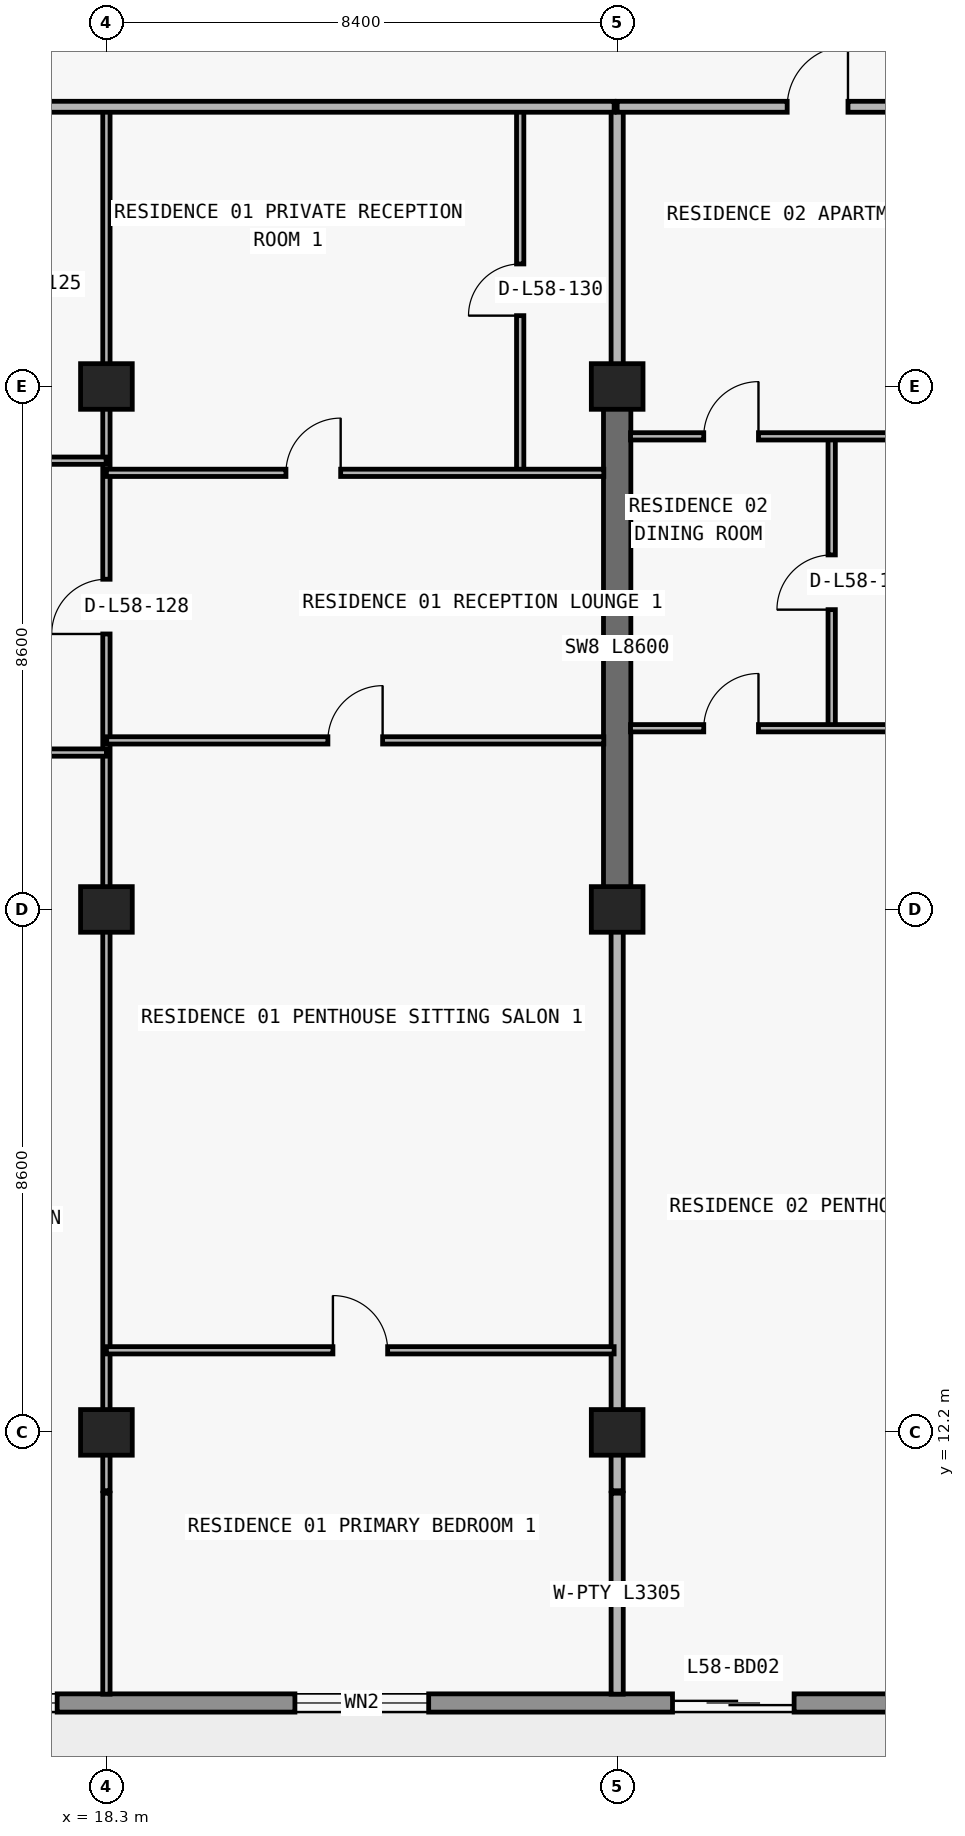
"""IFC4 building model, lengths in metres.
Left out: names, types, materials, properties, quantities, classifications, styles, units other than length and angle.
Written with IfcOpenShell. Run it as: python <this file> out.ifc"""

import sys

from ifc_helpers import new_model, si_unit, direction, frame, frame_2d, origin, origin_2d, place, context, subcontext, project, spatial, rectangle, extrude, element, fill, save


model = new_model("IFC4")
c1 = context("Model", 3, precision=1e-05, world=origin(), true_north=direction((0.0, 1.0)))
c2 = subcontext(c1, "Body", "Model", "MODEL_VIEW")
j1 = project(units=[si_unit("LENGTHUNIT", "METRE"), si_unit("PLANEANGLEUNIT", "RADIAN")], contexts=[c1])
p1 = place(None, origin())
s1 = spatial("IfcSite", under=j1, at=p1, CompositionType="ELEMENT")
p2 = place(p1, origin())
s2 = spatial("IfcBuilding", under=s1, at=p2, CompositionType="ELEMENT")
p3 = place(p2, frame((0.0, 0.0, 208.2)))
s3 = spatial("IfcBuildingStorey", under=s2, at=p3, CompositionType="ELEMENT", Elevation=208.2)
for number, where, z_axis, x_axis in (
    (1, (18.3, 12.2, 0.0), (0.0, 0.0, 1.0), (1.0, 0.0, 0.0)),
    (2, (26.7, 12.2, 0.0), (0.0, 0.0, 1.0), (1.0, 0.0, 0.0)),
    (3, (18.3, 20.8, 0.0), (0.0, 0.0, 1.0), (1.0, 0.0, 0.0)),
    (4, (26.7, 20.8, 0.0), (0.0, 0.0, 1.0), (1.0, 0.0, 0.0)),
    (5, (18.3, 29.4, 0.0), (0.0, 0.0, 1.0), (1.0, 0.0, 0.0)),
    (6, (26.7, 29.4, 0.0), (0.0, 0.0, 1.0), (1.0, 0.0, 0.0)),
):
    element("IfcColumn", number, at=place(p3, frame(where, z_axis=z_axis, x_axis=x_axis)), inside=s3, PredefinedType="COLUMN", context=c2, shape_type="SweptSolid", body=[
        extrude(rectangle(XDim=0.85, YDim=0.75, at=origin_2d()), origin(), (0.0, 0.0, 1.0), 3.05),
    ])
p4 = place(p3, frame((26.7, 20.8, 0.0), z_axis=(0.0, 0.0, 1.0), x_axis=(0.0, 1.0, 0.0)))
e7 = element("IfcWall", 7, at=p4, inside=s3, PredefinedType="SHEAR", context=c2, shape_type="SweptSolid", body=[
    extrude(rectangle(XDim=8.6, YDim=0.45, at=frame_2d((4.3, 0.0))), origin(), (0.0, 0.0, 1.0), 3.05),
])
p5 = place(p3, frame((67.7, 7.75, 0.0), z_axis=(0.0, 0.0, 1.0), x_axis=(-1.0, 0.0, 0.0)))
e8 = element("IfcWall", 8, at=p5, inside=s3, PredefinedType="STANDARD", context=c2, shape_type="SweptSolid", body=[
    extrude(rectangle(XDim=57.6, YDim=0.3, at=frame_2d((28.8, 0.0))), origin(), (0.0, 0.0, 1.0), 3.05),
])
p6 = place(p5, frame((54.69, 0.0, 0.0)))
e9 = element("IfcOpeningElement", 9, at=p6, cuts=e8, PredefinedType="OPENING", context=c2, shape_type="SweptSolid", body=[
    extrude(rectangle(XDim=2.0, YDim=2.3, at=frame_2d((1.0, 1.15))), frame((0.0, 0.16, 0.0), z_axis=(0.0, -1.0, 0.0), x_axis=(1.0, 0.0, 0.0)), (0.0, 0.0, 1.0), 0.32),
])
p7 = place(p5, frame((50.21, 0.0, 0.65)))
e10 = element("IfcOpeningElement", 10, at=p7, cuts=e8, PredefinedType="OPENING", context=c2, shape_type="SweptSolid", body=[
    extrude(rectangle(XDim=2.6, YDim=1.85, at=frame_2d((1.3, 0.925))), frame((0.0, 0.16, 0.0), z_axis=(0.0, -1.0, 0.0), x_axis=(1.0, 0.0, 0.0)), (0.0, 0.0, 1.0), 0.32),
])
p8 = place(p5, frame((44.1, 0.0, 0.85)))
e11 = element("IfcOpeningElement", 11, at=p8, cuts=e8, PredefinedType="OPENING", context=c2, shape_type="SweptSolid", body=[
    extrude(rectangle(XDim=2.2, YDim=1.55, at=frame_2d((1.1, 0.775))), frame((0.0, 0.16, 0.0), z_axis=(0.0, -1.0, 0.0), x_axis=(1.0, 0.0, 0.0)), (0.0, 0.0, 1.0), 0.32),
])
p9 = place(p5, frame((38.09, 0.0, 0.0)))
e12 = element("IfcOpeningElement", 12, at=p9, cuts=e8, PredefinedType="OPENING", context=c2, shape_type="SweptSolid", body=[
    extrude(rectangle(XDim=2.0, YDim=2.3, at=frame_2d((1.0, 1.15))), frame((0.0, 0.16, 0.0), z_axis=(0.0, -1.0, 0.0), x_axis=(1.0, 0.0, 0.0)), (0.0, 0.0, 1.0), 0.32),
])
p10 = place(p5, frame((33.41, 0.0, 0.65)))
e13 = element("IfcOpeningElement", 13, at=p10, cuts=e8, PredefinedType="OPENING", context=c2, shape_type="SweptSolid", body=[
    extrude(rectangle(XDim=2.6, YDim=1.85, at=frame_2d((1.3, 0.925))), frame((0.0, 0.16, 0.0), z_axis=(0.0, -1.0, 0.0), x_axis=(1.0, 0.0, 0.0)), (0.0, 0.0, 1.0), 0.32),
])
p11 = place(p5, frame((27.7, 0.0, 0.85)))
e14 = element("IfcOpeningElement", 14, at=p11, cuts=e8, PredefinedType="OPENING", context=c2, shape_type="SweptSolid", body=[
    extrude(rectangle(XDim=2.2, YDim=1.55, at=frame_2d((1.1, 0.775))), frame((0.0, 0.16, 0.0), z_axis=(0.0, -1.0, 0.0), x_axis=(1.0, 0.0, 0.0)), (0.0, 0.0, 1.0), 0.32),
])
p12 = place(p5, frame((19.7, 0.0, 0.85)))
e15 = element("IfcOpeningElement", 15, at=p12, cuts=e8, PredefinedType="OPENING", context=c2, shape_type="SweptSolid", body=[
    extrude(rectangle(XDim=2.2, YDim=1.55, at=frame_2d((1.1, 0.775))), frame((0.0, 0.16, 0.0), z_axis=(0.0, -1.0, 0.0), x_axis=(1.0, 0.0, 0.0)), (0.0, 0.0, 1.0), 0.32),
])
p13 = place(p5, frame((13.69, 0.0, 0.0)))
e16 = element("IfcOpeningElement", 16, at=p13, cuts=e8, PredefinedType="OPENING", context=c2, shape_type="SweptSolid", body=[
    extrude(rectangle(XDim=2.0, YDim=2.3, at=frame_2d((1.0, 1.15))), frame((0.0, 0.16, 0.0), z_axis=(0.0, -1.0, 0.0), x_axis=(1.0, 0.0, 0.0)), (0.0, 0.0, 1.0), 0.32),
])
p14 = place(p5, frame((9.01, 0.0, 0.65)))
e17 = element("IfcOpeningElement", 17, at=p14, cuts=e8, PredefinedType="OPENING", context=c2, shape_type="SweptSolid", body=[
    extrude(rectangle(XDim=2.6, YDim=1.85, at=frame_2d((1.3, 0.925))), frame((0.0, 0.16, 0.0), z_axis=(0.0, -1.0, 0.0), x_axis=(1.0, 0.0, 0.0)), (0.0, 0.0, 1.0), 0.32),
])
p15 = place(p5, frame((3.0, 0.0, 0.85)))
e18 = element("IfcOpeningElement", 18, at=p15, cuts=e8, PredefinedType="OPENING", context=c2, shape_type="SweptSolid", body=[
    extrude(rectangle(XDim=2.2, YDim=1.55, at=frame_2d((1.1, 0.775))), frame((0.0, 0.16, 0.0), z_axis=(0.0, -1.0, 0.0), x_axis=(1.0, 0.0, 0.0)), (0.0, 0.0, 1.0), 0.32),
])
p16 = place(p3, frame((18.3, 7.895, 0.0), z_axis=(0.0, 0.0, 1.0), x_axis=(0.0, 1.0, 0.0)))
e19 = element("IfcWall", 19, at=p16, inside=s3, PredefinedType="PARTITIONING", context=c2, shape_type="SweptSolid", body=[
    extrude(rectangle(XDim=3.305, YDim=0.12, at=frame_2d((1.652, 0.0))), origin(), (0.0, 0.0, 1.0), 3.05),
])
p17 = place(p3, frame((18.3, 11.24, 0.0), z_axis=(0.0, 0.0, 1.0), x_axis=(0.0, 1.0, 0.0)))
e20 = element("IfcWall", 20, at=p17, inside=s3, PredefinedType="PARTITIONING", context=c2, shape_type="SweptSolid", body=[
    extrude(rectangle(XDim=22.76, YDim=0.12, at=frame_2d((11.38, 0.0))), origin(), (0.0, 0.0, 1.0), 2.263),
])
p18 = place(p17, frame((14.09, 0.0, 0.0)))
e21 = element("IfcOpeningElement", 21, at=p18, cuts=e20, PredefinedType="OPENING", context=c2, shape_type="SweptSolid", body=[
    extrude(rectangle(XDim=0.9, YDim=2.15, at=frame_2d((0.45, 1.075))), frame((0.0, 0.07, 0.0), z_axis=(0.0, -1.0, 0.0), x_axis=(1.0, 0.0, 0.0)), (0.0, 0.0, 1.0), 0.14),
])
p19 = place(p3, frame((25.105, 27.98, 0.0), z_axis=(0.0, 0.0, 1.0), x_axis=(0.0, 1.0, 0.0)))
e22 = element("IfcWall", 22, at=p19, inside=s3, PredefinedType="PARTITIONING", context=c2, shape_type="SweptSolid", body=[
    extrude(rectangle(XDim=6.02, YDim=0.12, at=frame_2d((3.01, 0.0))), origin(), (0.0, 0.0, 1.0), 3.05),
])
p20 = place(p19, frame((2.585, 0.0, 0.0)))
e23 = element("IfcOpeningElement", 23, at=p20, cuts=e22, PredefinedType="OPENING", context=c2, shape_type="SweptSolid", body=[
    extrude(rectangle(XDim=0.85, YDim=2.1, at=frame_2d((0.425, 1.05))), frame((0.0, 0.07, 0.0), z_axis=(0.0, -1.0, 0.0), x_axis=(1.0, 0.0, 0.0)), (0.0, 0.0, 1.0), 0.14),
])
p21 = place(p3, frame((26.7, 7.895, 0.0), z_axis=(0.0, 0.0, 1.0), x_axis=(0.0, 1.0, 0.0)))
e24 = element("IfcWall", 24, at=p21, inside=s3, PredefinedType="PARTITIONING", context=c2, shape_type="SweptSolid", body=[
    extrude(rectangle(XDim=3.305, YDim=0.2, at=frame_2d((1.652, 0.0))), origin(), (0.0, 0.0, 1.0), 3.05),
])
p22 = place(p3, frame((26.7, 11.24, 0.0), z_axis=(0.0, 0.0, 1.0), x_axis=(0.0, 1.0, 0.0)))
e25 = element("IfcWall", 25, at=p22, inside=s3, PredefinedType="PARTITIONING", context=c2, shape_type="SweptSolid", body=[
    extrude(rectangle(XDim=9.555, YDim=0.2, at=frame_2d((4.777, 0.0))), origin(), (0.0, 0.0, 1.0), 2.263),
])
p23 = place(p3, frame((26.7, 29.405, 0.0), z_axis=(0.0, 0.0, 1.0), x_axis=(0.0, 1.0, 0.0)))
e26 = element("IfcWall", 26, at=p23, inside=s3, PredefinedType="PARTITIONING", context=c2, shape_type="SweptSolid", body=[
    extrude(rectangle(XDim=4.595, YDim=0.2, at=frame_2d((2.297, 0.0))), origin(), (0.0, 0.0, 1.0), 2.335),
])
p24 = place(p3, frame((30.228, 23.78, 0.0), z_axis=(0.0, 0.0, 1.0), x_axis=(0.0, 1.0, 0.0)))
e27 = element("IfcWall", 27, at=p24, inside=s3, PredefinedType="PARTITIONING", context=c2, shape_type="SweptSolid", body=[
    extrude(rectangle(XDim=4.8, YDim=0.12, at=frame_2d((2.4, 0.0))), origin(), (0.0, 0.0, 1.0), 3.05),
])
p25 = place(p24, frame((1.95, 0.0, 0.0)))
e28 = element("IfcOpeningElement", 28, at=p25, cuts=e27, PredefinedType="OPENING", context=c2, shape_type="SweptSolid", body=[
    extrude(rectangle(XDim=0.9, YDim=2.15, at=frame_2d((0.45, 1.075))), frame((0.0, 0.07, 0.0), z_axis=(0.0, -1.0, 0.0), x_axis=(1.0, 0.0, 0.0)), (0.0, 0.0, 1.0), 0.14),
])
p26 = place(p3, frame((18.3, 13.55, 0.0), z_axis=(0.0, 0.0, 1.0), x_axis=(1.0, 0.0, 0.0)))
e29 = element("IfcWall", 29, at=p26, inside=s3, PredefinedType="PARTITIONING", context=c2, shape_type="SweptSolid", body=[
    extrude(rectangle(XDim=8.35, YDim=0.12, at=frame_2d((4.175, 0.0))), origin(), (0.0, 0.0, 1.0), 3.05),
])
p27 = place(p26, frame((3.725, 0.0, 0.0)))
e30 = element("IfcOpeningElement", 30, at=p27, cuts=e29, PredefinedType="OPENING", context=c2, shape_type="SweptSolid", body=[
    extrude(rectangle(XDim=0.9, YDim=2.15, at=frame_2d((0.45, 1.075))), frame((0.0, 0.07, 0.0), z_axis=(0.0, -1.0, 0.0), x_axis=(1.0, 0.0, 0.0)), (0.0, 0.0, 1.0), 0.14),
])
p28 = place(p3, frame((10.1, 23.38, 0.0), z_axis=(0.0, 0.0, 1.0), x_axis=(1.0, 0.0, 0.0)))
e31 = element("IfcWall", 31, at=p28, inside=s3, PredefinedType="PARTITIONING", context=c2, shape_type="SweptSolid", body=[
    extrude(rectangle(XDim=8.2, YDim=0.12, at=frame_2d((4.1, 0.0))), origin(), (0.0, 0.0, 1.0), 3.05),
])
p29 = place(p28, frame((3.65, 0.0, 0.0)))
e32 = element("IfcOpeningElement", 32, at=p29, cuts=e31, PredefinedType="OPENING", context=c2, shape_type="SweptSolid", body=[
    extrude(rectangle(XDim=0.9, YDim=2.15, at=frame_2d((0.45, 1.075))), frame((0.0, 0.07, 0.0), z_axis=(0.0, -1.0, 0.0), x_axis=(1.0, 0.0, 0.0)), (0.0, 0.0, 1.0), 0.14),
])
p30 = place(p3, frame((18.305, 23.58, 0.0), z_axis=(0.0, 0.0, 1.0), x_axis=(1.0, 0.0, 0.0)))
e33 = element("IfcWall", 33, at=p30, inside=s3, PredefinedType="PARTITIONING", context=c2, shape_type="SweptSolid", body=[
    extrude(rectangle(XDim=8.175, YDim=0.12, at=frame_2d((4.087, 0.0))), origin(), (0.0, 0.0, 1.0), 3.05),
])
p31 = place(p30, frame((3.637, 0.0, 0.0)))
e34 = element("IfcOpeningElement", 34, at=p31, cuts=e33, PredefinedType="OPENING", context=c2, shape_type="SweptSolid", body=[
    extrude(rectangle(XDim=0.9, YDim=2.15, at=frame_2d((0.45, 1.075))), frame((0.0, 0.07, 0.0), z_axis=(0.0, -1.0, 0.0), x_axis=(1.0, 0.0, 0.0)), (0.0, 0.0, 1.0), 0.14),
])
p32 = place(p3, frame((26.92, 23.78, 0.0), z_axis=(0.0, 0.0, 1.0), x_axis=(1.0, 0.0, 0.0)))
e35 = element("IfcWall", 35, at=p32, inside=s3, PredefinedType="PARTITIONING", context=c2, shape_type="SweptSolid", body=[
    extrude(rectangle(XDim=8.18, YDim=0.12, at=frame_2d((4.09, 0.0))), origin(), (0.0, 0.0, 1.0), 3.05),
])
p33 = place(p32, frame((1.204, 0.0, 0.0)))
e36 = element("IfcOpeningElement", 36, at=p33, cuts=e35, PredefinedType="OPENING", context=c2, shape_type="SweptSolid", body=[
    extrude(rectangle(XDim=0.9, YDim=2.15, at=frame_2d((0.45, 1.075))), frame((0.0, 0.07, 0.0), z_axis=(0.0, -1.0, 0.0), x_axis=(1.0, 0.0, 0.0)), (0.0, 0.0, 1.0), 0.14),
])
p34 = place(p3, frame((18.3, 27.98, 0.0), z_axis=(0.0, 0.0, 1.0), x_axis=(1.0, 0.0, 0.0)))
e37 = element("IfcWall", 37, at=p34, inside=s3, PredefinedType="PARTITIONING", context=c2, shape_type="SweptSolid", body=[
    extrude(rectangle(XDim=8.18, YDim=0.12, at=frame_2d((4.09, 0.0))), origin(), (0.0, 0.0, 1.0), 3.05),
])
p35 = place(p34, frame((2.952, 0.0, 0.0)))
e38 = element("IfcOpeningElement", 38, at=p35, cuts=e37, PredefinedType="OPENING", context=c2, shape_type="SweptSolid", body=[
    extrude(rectangle(XDim=0.9, YDim=2.15, at=frame_2d((0.45, 1.075))), frame((0.0, 0.07, 0.0), z_axis=(0.0, -1.0, 0.0), x_axis=(1.0, 0.0, 0.0)), (0.0, 0.0, 1.0), 0.14),
])
p36 = place(p3, frame((10.1, 28.18, 0.0), z_axis=(0.0, 0.0, 1.0), x_axis=(1.0, 0.0, 0.0)))
e39 = element("IfcWall", 39, at=p36, inside=s3, PredefinedType="PARTITIONING", context=c2, shape_type="SweptSolid", body=[
    extrude(rectangle(XDim=8.195, YDim=0.12, at=frame_2d((4.097, 0.0))), origin(), (0.0, 0.0, 1.0), 3.05),
])
p37 = place(p36, frame((2.765, 0.0, 0.0)))
e40 = element("IfcOpeningElement", 40, at=p37, cuts=e39, PredefinedType="OPENING", context=c2, shape_type="SweptSolid", body=[
    extrude(rectangle(XDim=0.9, YDim=2.15, at=frame_2d((0.45, 1.075))), frame((0.0, 0.07, 0.0), z_axis=(0.0, -1.0, 0.0), x_axis=(1.0, 0.0, 0.0)), (0.0, 0.0, 1.0), 0.14),
])
p38 = place(p3, frame((26.92, 28.58, 0.0), z_axis=(0.0, 0.0, 1.0), x_axis=(1.0, 0.0, 0.0)))
e41 = element("IfcWall", 41, at=p38, inside=s3, PredefinedType="PARTITIONING", context=c2, shape_type="SweptSolid", body=[
    extrude(rectangle(XDim=8.175, YDim=0.12, at=frame_2d((4.087, 0.0))), origin(), (0.0, 0.0, 1.0), 3.05),
])
p39 = place(p38, frame((1.204, 0.0, 0.0)))
e42 = element("IfcOpeningElement", 42, at=p39, cuts=e41, PredefinedType="OPENING", context=c2, shape_type="SweptSolid", body=[
    extrude(rectangle(XDim=0.9, YDim=2.15, at=frame_2d((0.45, 1.075))), frame((0.0, 0.07, 0.0), z_axis=(0.0, -1.0, 0.0), x_axis=(1.0, 0.0, 0.0)), (0.0, 0.0, 1.0), 0.14),
])
p40 = place(p3, frame((10.105, 34.0, 0.0), z_axis=(0.0, 0.0, 1.0), x_axis=(1.0, 0.0, 0.0)))
e43 = element("IfcWall", 43, at=p40, inside=s3, PredefinedType="PARTITIONING", context=c2, shape_type="SweptSolid", body=[
    extrude(rectangle(XDim=16.545, YDim=0.18, at=frame_2d((8.272, 0.0))), origin(), (0.0, 0.0, 1.0), 3.05),
])
p41 = place(p40, frame((2.712, 0.0, 0.0)))
e44 = element("IfcOpeningElement", 44, at=p41, cuts=e43, PredefinedType="OPENING", context=c2, shape_type="SweptSolid", body=[
    extrude(rectangle(XDim=1.0, YDim=2.2, at=frame_2d((0.5, 1.1))), frame((0.0, 0.1, 0.0), z_axis=(0.0, -1.0, 0.0), x_axis=(1.0, 0.0, 0.0)), (0.0, 0.0, 1.0), 0.2),
])
p42 = place(p3, frame((26.7, 34.0, 0.0), z_axis=(0.0, 0.0, 1.0), x_axis=(1.0, 0.0, 0.0)))
e45 = element("IfcWall", 45, at=p42, inside=s3, PredefinedType="PARTITIONING", context=c2, shape_type="SweptSolid", body=[
    extrude(rectangle(XDim=41.0, YDim=0.18, at=frame_2d((20.5, 0.0))), origin(), (0.0, 0.0, 1.0), 3.05),
])
p43 = place(p42, frame((2.796, 0.0, 0.0)))
e46 = element("IfcOpeningElement", 46, at=p43, cuts=e45, PredefinedType="OPENING", context=c2, shape_type="SweptSolid", body=[
    extrude(rectangle(XDim=1.0, YDim=2.2, at=frame_2d((0.5, 1.1))), frame((0.0, 0.1, 0.0), z_axis=(0.0, -1.0, 0.0), x_axis=(1.0, 0.0, 0.0)), (0.0, 0.0, 1.0), 0.2),
])
p44 = place(p42, frame((27.199, 0.0, 0.0)))
e47 = element("IfcOpeningElement", 47, at=p44, cuts=e45, PredefinedType="OPENING", context=c2, shape_type="SweptSolid", body=[
    extrude(rectangle(XDim=1.0, YDim=2.2, at=frame_2d((0.5, 1.1))), frame((0.0, 0.1, 0.0), z_axis=(0.0, -1.0, 0.0), x_axis=(1.0, 0.0, 0.0)), (0.0, 0.0, 1.0), 0.2),
])
p45 = place(p7, origin())
e48 = element("IfcWindow", 48, at=p45, inside=s3, PartitioningType="SINGLE_PANEL", PredefinedType="WINDOW", context=c2, shape_type="SweptSolid", body=[
    extrude(rectangle(XDim=2.6, YDim=1.85, at=frame_2d((1.3, 0.925))), frame((0.0, 0.03, 0.0), z_axis=(0.0, -1.0, 0.0), x_axis=(1.0, 0.0, 0.0)), (0.0, 0.0, 1.0), 0.06),
])
fill(e10, e48)
p46 = place(p8, origin())
e49 = element("IfcWindow", 49, at=p46, inside=s3, PartitioningType="SINGLE_PANEL", PredefinedType="WINDOW", context=c2, shape_type="SweptSolid", body=[
    extrude(rectangle(XDim=2.2, YDim=1.55, at=frame_2d((1.1, 0.775))), frame((0.0, 0.03, 0.0), z_axis=(0.0, -1.0, 0.0), x_axis=(1.0, 0.0, 0.0)), (0.0, 0.0, 1.0), 0.06),
])
fill(e11, e49)
p47 = place(p9, origin())
e50 = element("IfcDoor", 50, at=p47, inside=s3, OperationType="DOUBLE_DOOR_SLIDING", PredefinedType="DOOR", context=c2, shape_type="SweptSolid", body=[
    extrude(rectangle(XDim=2.0, YDim=2.3, at=frame_2d((1.0, 1.15))), frame((0.0, 0.025, 0.0), z_axis=(0.0, -1.0, 0.0), x_axis=(1.0, 0.0, 0.0)), (0.0, 0.0, 1.0), 0.05),
])
fill(e12, e50)
p48 = place(p18, origin())
e51 = element("IfcDoor", 51, at=p48, inside=s3, OperationType="SINGLE_SWING_LEFT", PredefinedType="DOOR", context=c2, shape_type="SweptSolid", body=[
    extrude(rectangle(XDim=0.9, YDim=2.15, at=frame_2d((0.45, 1.075))), frame((0.0, 0.025, 0.0), z_axis=(0.0, -1.0, 0.0), x_axis=(1.0, 0.0, 0.0)), (0.0, 0.0, 1.0), 0.05),
])
fill(e21, e51)
p49 = place(p35, origin())
e52 = element("IfcDoor", 52, at=p49, inside=s3, OperationType="SINGLE_SWING_RIGHT", PredefinedType="DOOR", context=c2, shape_type="SweptSolid", body=[
    extrude(rectangle(XDim=0.9, YDim=2.15, at=frame_2d((0.45, 1.075))), frame((0.0, 0.025, 0.0), z_axis=(0.0, -1.0, 0.0), x_axis=(1.0, 0.0, 0.0)), (0.0, 0.0, 1.0), 0.05),
])
fill(e38, e52)
p50 = place(p20, origin())
e53 = element("IfcDoor", 53, at=p50, inside=s3, OperationType="SINGLE_SWING_LEFT", PredefinedType="DOOR", context=c2, shape_type="SweptSolid", body=[
    extrude(rectangle(XDim=0.85, YDim=2.1, at=frame_2d((0.425, 1.05))), frame((0.0, 0.025, 0.0), z_axis=(0.0, -1.0, 0.0), x_axis=(1.0, 0.0, 0.0)), (0.0, 0.0, 1.0), 0.05),
])
fill(e23, e53)
p51 = place(p31, origin())
e54 = element("IfcDoor", 54, at=p51, inside=s3, OperationType="SINGLE_SWING_RIGHT", PredefinedType="DOOR", context=c2, shape_type="SweptSolid", body=[
    extrude(rectangle(XDim=0.9, YDim=2.15, at=frame_2d((0.45, 1.075))), frame((0.0, 0.025, 0.0), z_axis=(0.0, -1.0, 0.0), x_axis=(1.0, 0.0, 0.0)), (0.0, 0.0, 1.0), 0.05),
])
fill(e34, e54)
p52 = place(p27, origin())
e55 = element("IfcDoor", 55, at=p52, inside=s3, OperationType="SINGLE_SWING_LEFT", PredefinedType="DOOR", context=c2, shape_type="SweptSolid", body=[
    extrude(rectangle(XDim=0.9, YDim=2.15, at=frame_2d((0.45, 1.075))), frame((0.0, 0.025, 0.0), z_axis=(0.0, -1.0, 0.0), x_axis=(1.0, 0.0, 0.0)), (0.0, 0.0, 1.0), 0.05),
])
fill(e30, e55)
p53 = place(p43, origin())
e56 = element("IfcDoor", 56, at=p53, inside=s3, OperationType="SINGLE_SWING_RIGHT", PredefinedType="DOOR", context=c2, shape_type="SweptSolid", body=[
    extrude(rectangle(XDim=1.0, YDim=2.2, at=frame_2d((0.5, 1.1))), frame((0.0, 0.025, 0.0), z_axis=(0.0, -1.0, 0.0), x_axis=(1.0, 0.0, 0.0)), (0.0, 0.0, 1.0), 0.05),
])
fill(e46, e56)
p54 = place(p39, origin())
e57 = element("IfcDoor", 57, at=p54, inside=s3, OperationType="SINGLE_SWING_RIGHT", PredefinedType="DOOR", context=c2, shape_type="SweptSolid", body=[
    extrude(rectangle(XDim=0.9, YDim=2.15, at=frame_2d((0.45, 1.075))), frame((0.0, 0.025, 0.0), z_axis=(0.0, -1.0, 0.0), x_axis=(1.0, 0.0, 0.0)), (0.0, 0.0, 1.0), 0.05),
])
fill(e42, e57)
p55 = place(p25, origin())
e58 = element("IfcDoor", 58, at=p55, inside=s3, OperationType="SINGLE_SWING_LEFT", PredefinedType="DOOR", context=c2, shape_type="SweptSolid", body=[
    extrude(rectangle(XDim=0.9, YDim=2.15, at=frame_2d((0.45, 1.075))), frame((0.0, 0.025, 0.0), z_axis=(0.0, -1.0, 0.0), x_axis=(1.0, 0.0, 0.0)), (0.0, 0.0, 1.0), 0.05),
])
fill(e28, e58)
p56 = place(p33, origin())
e59 = element("IfcDoor", 59, at=p56, inside=s3, OperationType="SINGLE_SWING_RIGHT", PredefinedType="DOOR", context=c2, shape_type="SweptSolid", body=[
    extrude(rectangle(XDim=0.9, YDim=2.15, at=frame_2d((0.45, 1.075))), frame((0.0, 0.025, 0.0), z_axis=(0.0, -1.0, 0.0), x_axis=(1.0, 0.0, 0.0)), (0.0, 0.0, 1.0), 0.05),
])
fill(e36, e59)
save(model, sys.argv[1])
